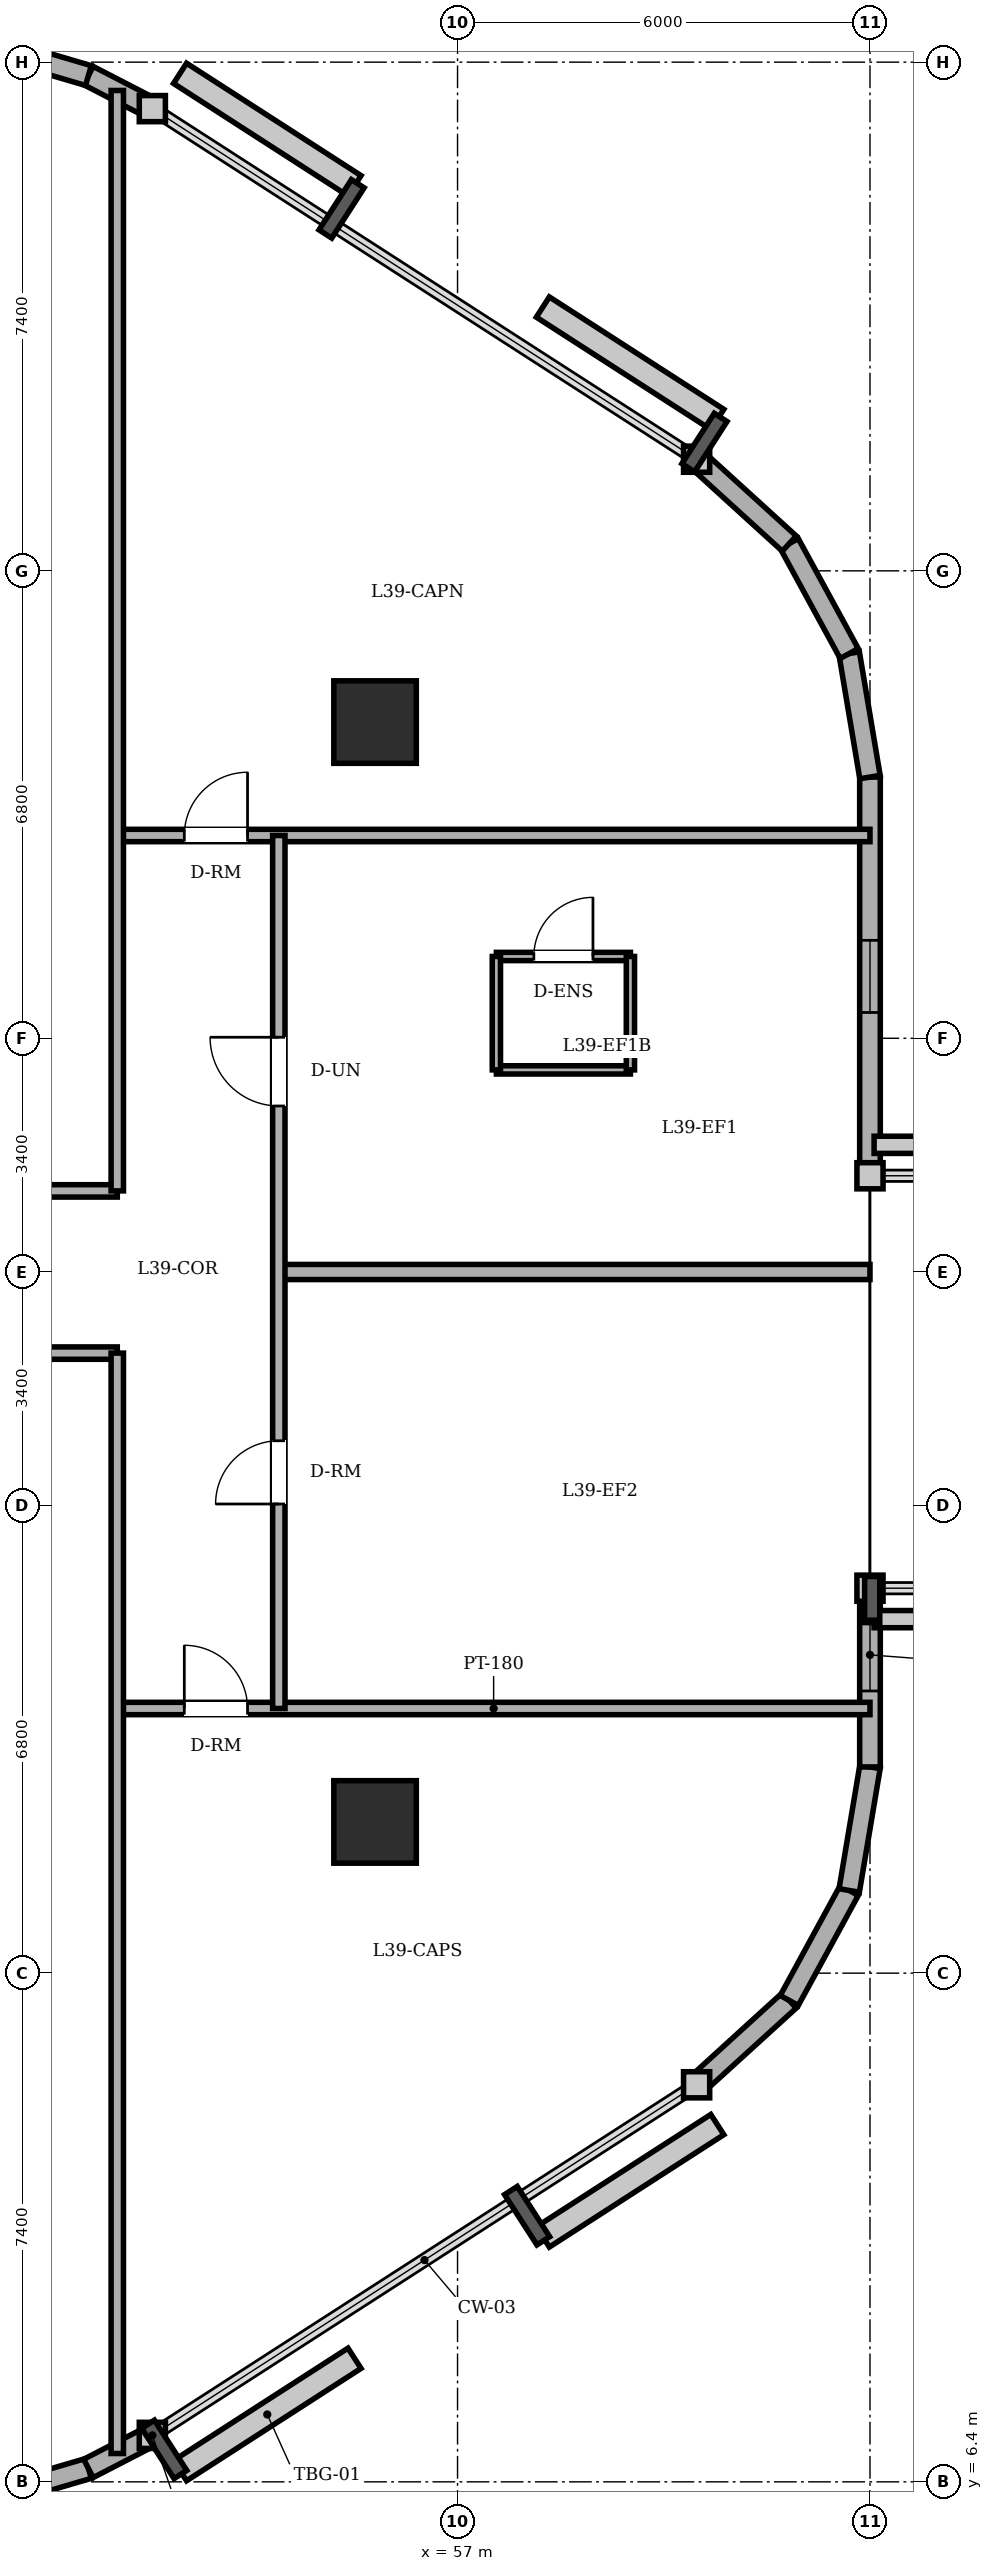
"""IFC4 building model, lengths in metres.
Left out: names, types, materials, properties, quantities, classifications, styles, units other than length and angle.
Written with IfcOpenShell. Run it as: python <this file> out.ifc"""

import sys

from ifc_helpers import new_model, si_unit, direction, frame, frame_2d, origin, origin_2d, place, context, subcontext, project, spatial, rectangle, circle, extrude, element, fill, save


model = new_model("IFC4")
c1 = context("Model", 3, precision=1e-05, world=origin(), true_north=direction((0.0, 1.0)))
c2 = subcontext(c1, "Body", "Model", "MODEL_VIEW")
j1 = project(units=[si_unit("LENGTHUNIT", "METRE"), si_unit("PLANEANGLEUNIT", "RADIAN")], contexts=[c1])
p1 = place(None, origin())
s1 = spatial("IfcSite", under=j1, at=p1, CompositionType="ELEMENT")
p2 = place(p1, origin())
s2 = spatial("IfcBuilding", under=s1, at=p2, CompositionType="ELEMENT")
p3 = place(p2, frame((0.0, 0.0, 151.0)))
s3 = spatial("IfcBuildingStorey", under=s2, at=p3, CompositionType="ELEMENT", Elevation=151.0)
for number, where, z_axis, x_axis in (
    (1, (55.8, 16.0, 0.0), (0.0, 0.0, 1.0), (1.0, 0.0, 0.0)),
    (2, (55.8, 32.0, 0.0), (0.0, 0.0, 1.0), (1.0, 0.0, 0.0)),
):
    element("IfcColumn", number, at=place(p3, frame(where, z_axis=z_axis, x_axis=x_axis)), inside=s3, PredefinedType="COLUMN", context=c2, shape_type="SweptSolid", body=[
        extrude(circle(Radius=0.6, at=origin_2d()), origin(), (0.0, 0.0, 1.0), 3.6),
    ])
p4 = place(p3, frame((50.625, 6.3, 0.0), z_axis=(0.0, 0.0, 1.0), x_axis=(0.959528674476, 0.281610942363, 0.0)))
e3 = element("IfcWall", 3, at=p4, inside=s3, PredefinedType="SOLIDWALL", context=c2, shape_type="SweptSolid", body=[
    extrude(rectangle(XDim=1.047, YDim=0.3, at=frame_2d((0.524, 0.0))), origin(), (0.0, 0.0, 1.0), 3.4),
])
p5 = place(p3, frame((51.63, 6.595, 0.0), z_axis=(0.0, 0.0, 1.0), x_axis=(0.888283247196, 0.459296062198, 0.0)))
e4 = element("IfcWall", 4, at=p5, inside=s3, PredefinedType="SOLIDWALL", context=c2, shape_type="SweptSolid", body=[
    extrude(rectangle(XDim=1.047, YDim=0.3, at=frame_2d((0.523, 0.0))), origin(), (0.0, 0.0, 1.0), 3.4),
])
p6 = place(p3, frame((60.478, 12.176, 0.0), z_axis=(0.0, 0.0, 1.0), x_axis=(0.73947929393, 0.673179302897, 0.0)))
e5 = element("IfcWall", 5, at=p6, inside=s3, PredefinedType="SOLIDWALL", context=c2, shape_type="SweptSolid", body=[
    extrude(rectangle(XDim=1.823, YDim=0.3, at=frame_2d((0.911, 0.0))), origin(), (0.0, 0.0, 1.0), 3.4),
])
p7 = place(p3, frame((61.826, 13.403, 0.0), z_axis=(0.0, 0.0, 1.0), x_axis=(0.478608030646, 0.878028674362, 0.0)))
e6 = element("IfcWall", 6, at=p7, inside=s3, PredefinedType="SOLIDWALL", context=c2, shape_type="SweptSolid", body=[
    extrude(rectangle(XDim=1.822, YDim=0.3, at=frame_2d((0.911, 0.0))), origin(), (0.0, 0.0, 1.0), 3.4),
])
p8 = place(p3, frame((62.698, 15.003, 0.0), z_axis=(0.0, 0.0, 1.0), x_axis=(0.165724081207, 0.986172159873, 0.0)))
e7 = element("IfcWall", 7, at=p8, inside=s3, PredefinedType="SOLIDWALL", context=c2, shape_type="SweptSolid", body=[
    extrude(rectangle(XDim=1.822, YDim=0.3, at=frame_2d((0.911, 0.0))), origin(), (0.0, 0.0, 1.0), 3.4),
])
p9 = place(p3, frame((63.0, 16.8, 0.0), z_axis=(0.0, 0.0, 1.0), x_axis=(0.0, 1.0, 0.0)))
e8 = element("IfcWall", 8, at=p9, inside=s3, PredefinedType="SOLIDWALL", context=c2, shape_type="SweptSolid", body=[
    extrude(rectangle(XDim=2.6, YDim=0.3, at=frame_2d((1.3, 0.0))), origin(), (0.0, 0.0, 1.0), 3.4),
])
p10 = place(p9, frame((1.105, 0.0, 0.85)))
e9 = element("IfcOpeningElement", 9, at=p10, cuts=e8, PredefinedType="OPENING", context=c2, shape_type="SweptSolid", body=[
    extrude(rectangle(XDim=1.05, YDim=1.55, at=frame_2d((0.525, 0.775))), frame((0.0, 0.16, 0.0), z_axis=(0.0, -1.0, 0.0), x_axis=(1.0, 0.0, 0.0)), (0.0, 0.0, 1.0), 0.32),
])
p11 = place(p3, frame((63.0, 25.4, 0.0), z_axis=(0.0, 0.0, 1.0), x_axis=(0.0, 1.0, 0.0)))
e10 = element("IfcWall", 10, at=p11, inside=s3, PredefinedType="SOLIDWALL", context=c2, shape_type="SweptSolid", body=[
    extrude(rectangle(XDim=5.8, YDim=0.3, at=frame_2d((2.9, 0.0))), origin(), (0.0, 0.0, 1.0), 3.4),
])
p12 = place(p11, frame((2.375, 0.0, 0.85)))
e11 = element("IfcOpeningElement", 11, at=p12, cuts=e10, PredefinedType="OPENING", context=c2, shape_type="SweptSolid", body=[
    extrude(rectangle(XDim=1.05, YDim=1.55, at=frame_2d((0.525, 0.775))), frame((0.0, 0.16, 0.0), z_axis=(0.0, -1.0, 0.0), x_axis=(1.0, 0.0, 0.0)), (0.0, 0.0, 1.0), 0.32),
])
p13 = place(p3, frame((63.0, 31.2, 0.0), z_axis=(0.0, 0.0, 1.0), x_axis=(-0.165724081207, 0.986172159873, 0.0)))
e12 = element("IfcWall", 12, at=p13, inside=s3, PredefinedType="SOLIDWALL", context=c2, shape_type="SweptSolid", body=[
    extrude(rectangle(XDim=1.822, YDim=0.3, at=frame_2d((0.911, 0.0))), origin(), (0.0, 0.0, 1.0), 3.4),
])
p14 = place(p3, frame((62.698, 32.997, 0.0), z_axis=(0.0, 0.0, 1.0), x_axis=(-0.478608030646, 0.878028674362, 0.0)))
e13 = element("IfcWall", 13, at=p14, inside=s3, PredefinedType="SOLIDWALL", context=c2, shape_type="SweptSolid", body=[
    extrude(rectangle(XDim=1.822, YDim=0.3, at=frame_2d((0.911, 0.0))), origin(), (0.0, 0.0, 1.0), 3.4),
])
p15 = place(p3, frame((61.826, 34.597, 0.0), z_axis=(0.0, 0.0, 1.0), x_axis=(-0.73947929393, 0.673179302897, 0.0)))
e14 = element("IfcWall", 14, at=p15, inside=s3, PredefinedType="SOLIDWALL", context=c2, shape_type="SweptSolid", body=[
    extrude(rectangle(XDim=1.823, YDim=0.3, at=frame_2d((0.911, 0.0))), origin(), (0.0, 0.0, 1.0), 3.4),
])
p16 = place(p3, frame((52.56, 40.924, 0.0), z_axis=(0.0, 0.0, 1.0), x_axis=(-0.888283247196, 0.459296062198, 0.0)))
e15 = element("IfcWall", 15, at=p16, inside=s3, PredefinedType="SOLIDWALL", context=c2, shape_type="SweptSolid", body=[
    extrude(rectangle(XDim=1.047, YDim=0.3, at=frame_2d((0.523, 0.0))), origin(), (0.0, 0.0, 1.0), 3.4),
])
p17 = place(p3, frame((51.63, 41.405, 0.0), z_axis=(0.0, 0.0, 1.0), x_axis=(-0.959528674476, 0.281610942363, 0.0)))
e16 = element("IfcWall", 16, at=p17, inside=s3, PredefinedType="SOLIDWALL", context=c2, shape_type="SweptSolid", body=[
    extrude(rectangle(XDim=1.047, YDim=0.3, at=frame_2d((0.524, 0.0))), origin(), (0.0, 0.0, 1.0), 3.4),
])
p18 = place(p3, frame((57.565, 28.59, 0.0), z_axis=(0.0, 0.0, 1.0), x_axis=(1.0, 0.0, 0.0)))
e17 = element("IfcWall", 17, at=p18, inside=s3, PredefinedType="PARTITIONING", context=c2, shape_type="SweptSolid", body=[
    extrude(rectangle(XDim=1.95, YDim=0.12, at=frame_2d((0.975, 0.0))), origin(), (0.0, 0.0, 1.0), 3.4),
])
p19 = place(p18, frame((0.545, 0.0, 0.0)))
e18 = element("IfcOpeningElement", 18, at=p19, cuts=e17, PredefinedType="OPENING", context=c2, shape_type="SweptSolid", body=[
    extrude(rectangle(XDim=0.86, YDim=2.1, at=frame_2d((0.43, 1.05))), frame((0.0, 0.07, 0.0), z_axis=(0.0, -1.0, 0.0), x_axis=(1.0, 0.0, 0.0)), (0.0, 0.0, 1.0), 0.14),
])
p20 = place(p3, frame((59.515, 26.94, 0.0), z_axis=(0.0, 0.0, 1.0), x_axis=(-1.0, 0.0, 0.0)))
e19 = element("IfcWall", 19, at=p20, inside=s3, PredefinedType="PARTITIONING", context=c2, shape_type="SweptSolid", body=[
    extrude(rectangle(XDim=1.95, YDim=0.12, at=frame_2d((0.975, 0.0))), origin(), (0.0, 0.0, 1.0), 3.4),
])
for number, where, z_axis, x_axis in (
    (20, (57.565, 28.59, 0.0), (0.0, 0.0, 1.0), (0.0, -1.0, 0.0)),
    (21, (59.515, 26.94, 0.0), (0.0, 0.0, 1.0), (0.0, 1.0, 0.0)),
):
    element("IfcWall", number, at=place(p3, frame(where, z_axis=z_axis, x_axis=x_axis)), inside=s3, PredefinedType="PARTITIONING", context=c2, shape_type="SweptSolid", body=[
        extrude(rectangle(XDim=1.65, YDim=0.12, at=frame_2d((0.825, 0.0))), origin(), (0.0, 0.0, 1.0), 3.4),
    ])
p21 = place(p3, frame((52.05, 17.65, 0.0), z_axis=(0.0, 0.0, 1.0), x_axis=(1.0, 0.0, 0.0)))
e22 = element("IfcWall", 22, at=p21, inside=s3, PredefinedType="PARTITIONING", context=c2, shape_type="SweptSolid", body=[
    extrude(rectangle(XDim=10.95, YDim=0.18, at=frame_2d((5.475, 0.0))), origin(), (0.0, 0.0, 1.0), 3.4),
])
p22 = place(p21, frame((0.975, 0.0, 0.0)))
e23 = element("IfcOpeningElement", 23, at=p22, cuts=e22, PredefinedType="OPENING", context=c2, shape_type="SweptSolid", body=[
    extrude(rectangle(XDim=0.92, YDim=2.1, at=frame_2d((0.46, 1.05))), frame((0.0, 0.1, 0.0), z_axis=(0.0, -1.0, 0.0), x_axis=(1.0, 0.0, 0.0)), (0.0, 0.0, 1.0), 0.2),
])
p23 = place(p3, frame((39.85, 22.82, 0.0), z_axis=(0.0, 0.0, 1.0), x_axis=(1.0, 0.0, 0.0)))
e24 = element("IfcWall", 24, at=p23, inside=s3, PredefinedType="PARTITIONING", context=c2, shape_type="SweptSolid", body=[
    extrude(rectangle(XDim=12.2, YDim=0.18, at=frame_2d((6.1, 0.0))), origin(), (0.0, 0.0, 1.0), 3.4),
])
p24 = place(p23, frame((9.366, 0.0, 0.0)))
e25 = element("IfcOpeningElement", 25, at=p24, cuts=e24, PredefinedType="OPENING", context=c2, shape_type="SweptSolid", body=[
    extrude(rectangle(XDim=1.0, YDim=2.15, at=frame_2d((0.5, 1.075))), frame((0.0, 0.1, 0.0), z_axis=(0.0, -1.0, 0.0), x_axis=(1.0, 0.0, 0.0)), (0.0, 0.0, 1.0), 0.2),
])
p25 = place(p3, frame((54.4, 24.0, 0.0), z_axis=(0.0, 0.0, 1.0), x_axis=(1.0, 0.0, 0.0)))
e26 = element("IfcWall", 26, at=p25, inside=s3, PredefinedType="PARTITIONING", context=c2, shape_type="SweptSolid", body=[
    extrude(rectangle(XDim=8.6, YDim=0.22, at=frame_2d((4.3, 0.0))), origin(), (0.0, 0.0, 1.0), 3.022),
])
p26 = place(p3, frame((39.85, 25.18, 0.0), z_axis=(0.0, 0.0, 1.0), x_axis=(1.0, 0.0, 0.0)))
e27 = element("IfcWall", 27, at=p26, inside=s3, PredefinedType="PARTITIONING", context=c2, shape_type="SweptSolid", body=[
    extrude(rectangle(XDim=12.2, YDim=0.18, at=frame_2d((6.1, 0.0))), origin(), (0.0, 0.0, 1.0), 3.4),
])
p27 = place(p26, frame((7.97, 0.0, 0.0)))
e28 = element("IfcOpeningElement", 28, at=p27, cuts=e27, PredefinedType="OPENING", context=c2, shape_type="SweptSolid", body=[
    extrude(rectangle(XDim=1.0, YDim=2.15, at=frame_2d((0.5, 1.075))), frame((0.0, 0.1, 0.0), z_axis=(0.0, -1.0, 0.0), x_axis=(1.0, 0.0, 0.0)), (0.0, 0.0, 1.0), 0.2),
])
p28 = place(p3, frame((52.05, 30.35, 0.0), z_axis=(0.0, 0.0, 1.0), x_axis=(1.0, 0.0, 0.0)))
e29 = element("IfcWall", 29, at=p28, inside=s3, PredefinedType="PARTITIONING", context=c2, shape_type="SweptSolid", body=[
    extrude(rectangle(XDim=10.95, YDim=0.18, at=frame_2d((5.475, 0.0))), origin(), (0.0, 0.0, 1.0), 3.4),
])
p29 = place(p28, frame((0.975, 0.0, 0.0)))
e30 = element("IfcOpeningElement", 30, at=p29, cuts=e29, PredefinedType="OPENING", context=c2, shape_type="SweptSolid", body=[
    extrude(rectangle(XDim=0.92, YDim=2.1, at=frame_2d((0.46, 1.05))), frame((0.0, 0.1, 0.0), z_axis=(0.0, -1.0, 0.0), x_axis=(1.0, 0.0, 0.0)), (0.0, 0.0, 1.0), 0.2),
])
for number, where, z_axis, x_axis in (
    (31, (52.05, 6.812, 0.0), (0.0, 0.0, 1.0), (0.0, 1.0, 0.0)),
    (32, (52.05, 25.18, 0.0), (0.0, 0.0, 1.0), (0.0, 1.0, 0.0)),
):
    element("IfcWall", number, at=place(p3, frame(where, z_axis=z_axis, x_axis=x_axis)), inside=s3, PredefinedType="PARTITIONING", context=c2, shape_type="SweptSolid", body=[
        extrude(rectangle(XDim=16.008, YDim=0.18, at=frame_2d((8.004, 0.0))), origin(), (0.0, 0.0, 1.0), 3.4),
    ])
p30 = place(p3, frame((54.4, 17.65, 0.0), z_axis=(0.0, 0.0, 1.0), x_axis=(0.0, 1.0, 0.0)))
e33 = element("IfcWall", 33, at=p30, inside=s3, PredefinedType="PARTITIONING", context=c2, shape_type="SweptSolid", body=[
    extrude(rectangle(XDim=12.7, YDim=0.18, at=frame_2d((6.35, 0.0))), origin(), (0.0, 0.0, 1.0), 3.4),
])
p31 = place(p30, frame((8.765, 0.0, 0.0)))
e34 = element("IfcOpeningElement", 34, at=p31, cuts=e33, PredefinedType="OPENING", context=c2, shape_type="SweptSolid", body=[
    extrude(rectangle(XDim=1.0, YDim=2.15, at=frame_2d((0.5, 1.075))), frame((0.0, 0.1, 0.0), z_axis=(0.0, -1.0, 0.0), x_axis=(1.0, 0.0, 0.0)), (0.0, 0.0, 1.0), 0.2),
])
p32 = place(p30, frame((2.975, 0.0, 0.0)))
e35 = element("IfcOpeningElement", 35, at=p32, cuts=e33, PredefinedType="OPENING", context=c2, shape_type="SweptSolid", body=[
    extrude(rectangle(XDim=0.92, YDim=2.1, at=frame_2d((0.46, 1.05))), frame((0.0, 0.1, 0.0), z_axis=(0.0, -1.0, 0.0), x_axis=(1.0, 0.0, 0.0)), (0.0, 0.0, 1.0), 0.2),
])
p33 = place(p10, origin())
e36 = element("IfcWindow", 36, at=p33, inside=s3, PartitioningType="SINGLE_PANEL", PredefinedType="WINDOW", context=c2, shape_type="SweptSolid", body=[
    extrude(rectangle(XDim=1.05, YDim=1.55, at=frame_2d((0.525, 0.775))), frame((0.0, 0.03, 0.0), z_axis=(0.0, -1.0, 0.0), x_axis=(1.0, 0.0, 0.0)), (0.0, 0.0, 1.0), 0.06),
])
fill(e9, e36)
p34 = place(p12, origin())
e37 = element("IfcWindow", 37, at=p34, inside=s3, PartitioningType="SINGLE_PANEL", PredefinedType="WINDOW", context=c2, shape_type="SweptSolid", body=[
    extrude(rectangle(XDim=1.05, YDim=1.55, at=frame_2d((0.525, 0.775))), frame((0.0, 0.03, 0.0), z_axis=(0.0, -1.0, 0.0), x_axis=(1.0, 0.0, 0.0)), (0.0, 0.0, 1.0), 0.06),
])
fill(e11, e37)
p35 = place(p19, origin())
e38 = element("IfcDoor", 38, at=p35, inside=s3, OperationType="SINGLE_SWING_RIGHT", PredefinedType="DOOR", context=c2, shape_type="SweptSolid", body=[
    extrude(rectangle(XDim=0.86, YDim=2.1, at=frame_2d((0.43, 1.05))), frame((0.0, 0.025, 0.0), z_axis=(0.0, -1.0, 0.0), x_axis=(1.0, 0.0, 0.0)), (0.0, 0.0, 1.0), 0.05),
])
fill(e18, e38)
p36 = place(p29, origin())
e39 = element("IfcDoor", 39, at=p36, inside=s3, OperationType="SINGLE_SWING_RIGHT", PredefinedType="DOOR", context=c2, shape_type="SweptSolid", body=[
    extrude(rectangle(XDim=0.92, YDim=2.1, at=frame_2d((0.46, 1.05))), frame((0.0, 0.025, 0.0), z_axis=(0.0, -1.0, 0.0), x_axis=(1.0, 0.0, 0.0)), (0.0, 0.0, 1.0), 0.05),
])
fill(e30, e39)
p37 = place(p22, origin())
e40 = element("IfcDoor", 40, at=p37, inside=s3, OperationType="SINGLE_SWING_LEFT", PredefinedType="DOOR", context=c2, shape_type="SweptSolid", body=[
    extrude(rectangle(XDim=0.92, YDim=2.1, at=frame_2d((0.46, 1.05))), frame((0.0, 0.025, 0.0), z_axis=(0.0, -1.0, 0.0), x_axis=(1.0, 0.0, 0.0)), (0.0, 0.0, 1.0), 0.05),
])
fill(e23, e40)
p38 = place(p31, origin())
e41 = element("IfcDoor", 41, at=p38, inside=s3, OperationType="SINGLE_SWING_RIGHT", PredefinedType="DOOR", context=c2, shape_type="SweptSolid", body=[
    extrude(rectangle(XDim=1.0, YDim=2.15, at=frame_2d((0.5, 1.075))), frame((0.0, 0.025, 0.0), z_axis=(0.0, -1.0, 0.0), x_axis=(1.0, 0.0, 0.0)), (0.0, 0.0, 1.0), 0.05),
])
fill(e34, e41)
p39 = place(p32, origin())
e42 = element("IfcDoor", 42, at=p39, inside=s3, OperationType="SINGLE_SWING_LEFT", PredefinedType="DOOR", context=c2, shape_type="SweptSolid", body=[
    extrude(rectangle(XDim=0.92, YDim=2.1, at=frame_2d((0.46, 1.05))), frame((0.0, 0.025, 0.0), z_axis=(0.0, -1.0, 0.0), x_axis=(1.0, 0.0, 0.0)), (0.0, 0.0, 1.0), 0.05),
])
fill(e35, e42)
save(model, sys.argv[1])
